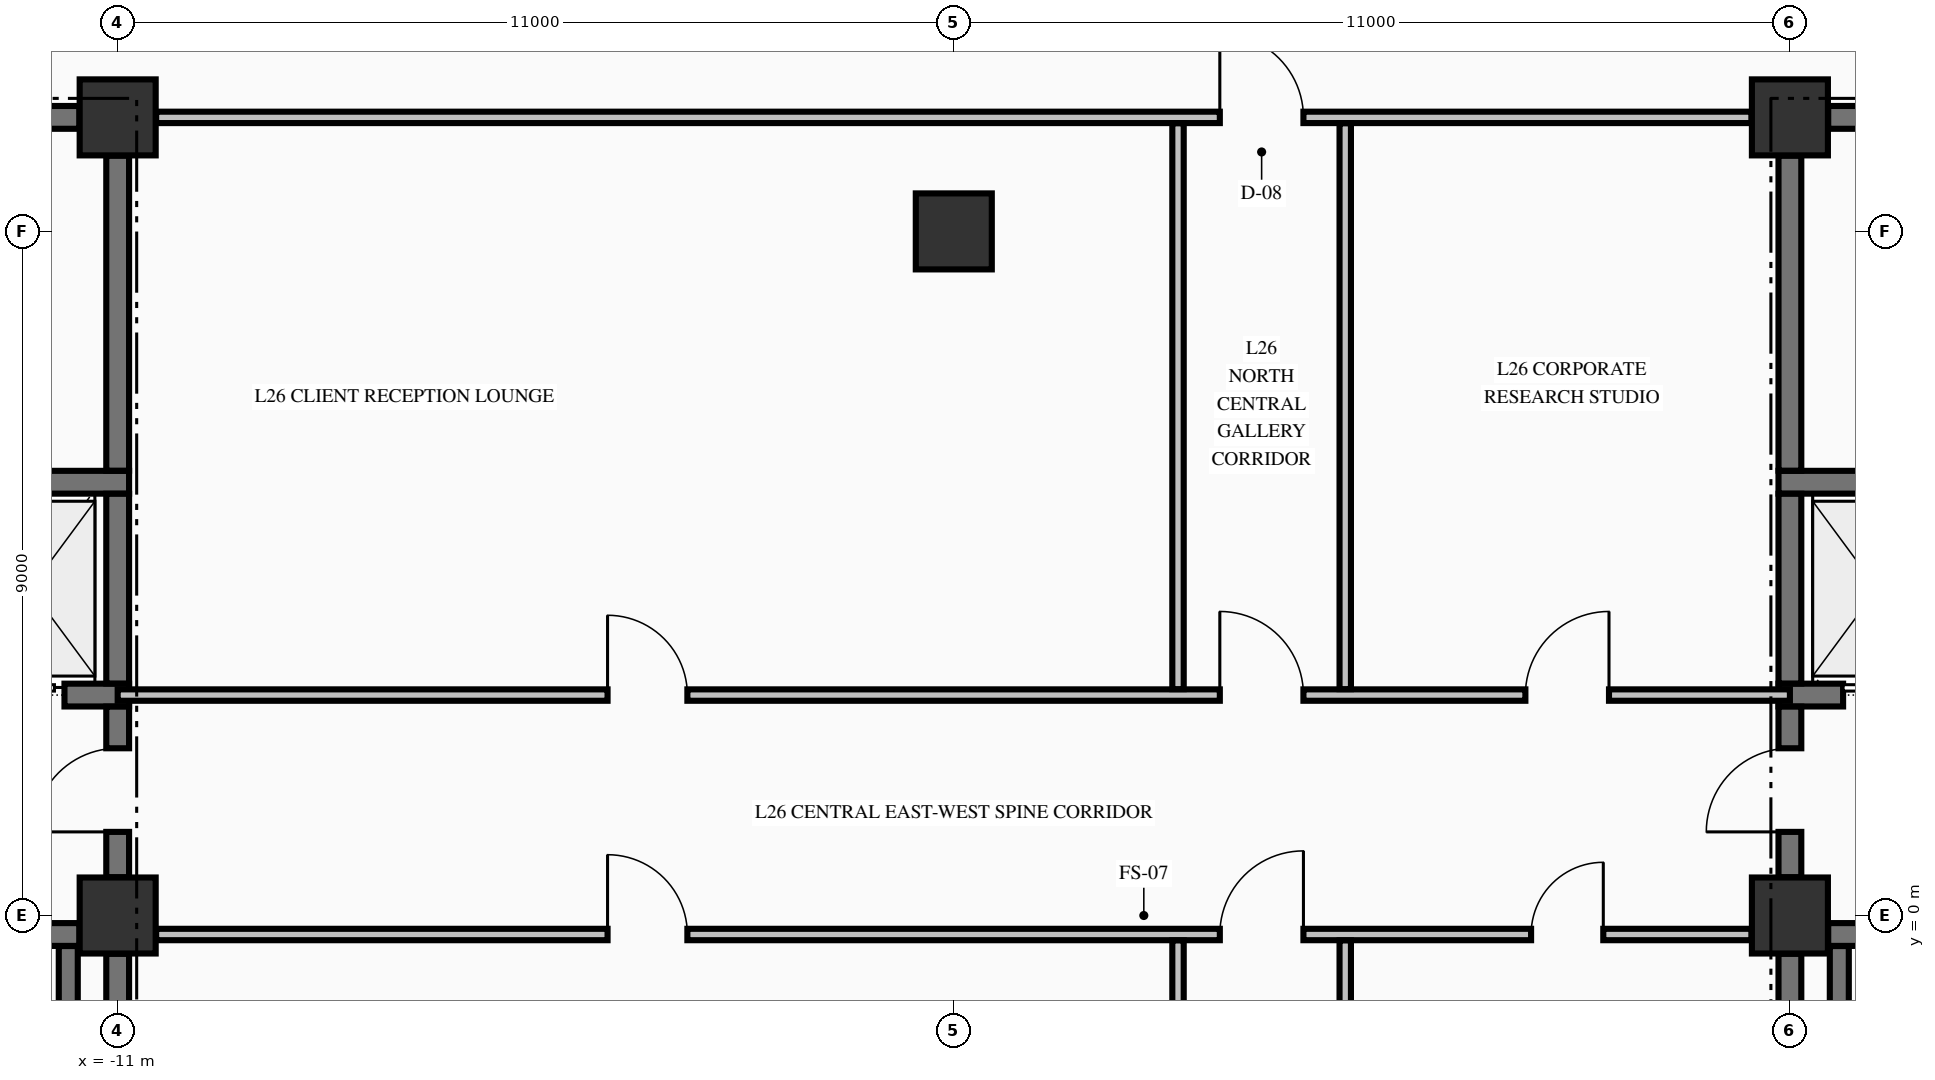
"""IFC4 building model, lengths in metres.
Left out: names, types, materials, properties, quantities, classifications, styles, units other than length and angle.
Written with IfcOpenShell. Run it as: python <this file> out.ifc"""

import sys

from ifc_helpers import new_model, si_unit, direction, frame, frame_2d, origin, origin_2d, place, context, subcontext, project, spatial, rectangle, extrude, element, fill, save


model = new_model("IFC4")
c1 = context("Model", 3, precision=1e-05, world=origin(), true_north=direction((0.0, 1.0)))
c2 = subcontext(c1, "Body", "Model", "MODEL_VIEW")
j1 = project(units=[si_unit("LENGTHUNIT", "METRE"), si_unit("PLANEANGLEUNIT", "RADIAN")], contexts=[c1])
p1 = place(None, origin())
s1 = spatial("IfcSite", under=j1, at=p1, CompositionType="ELEMENT")
p2 = place(p1, origin())
s2 = spatial("IfcBuilding", under=s1, at=p2, CompositionType="ELEMENT")
p3 = place(p2, frame((0.0, 0.0, 105.64)))
s3 = spatial("IfcBuildingStorey", under=s2, at=p3, CompositionType="ELEMENT", Elevation=105.64)
for number, where, z_axis, x_axis in (
    (1, (-11.0, 0.0, -0.25), (0.0, 0.0, 1.0), (1.0, 0.0, 0.0)),
    (2, (-11.0, 10.5, -0.25), (0.0, 0.0, 1.0), (1.0, 0.0, 0.0)),
    (3, (11.0, 0.0, -0.25), (0.0, 0.0, 1.0), (1.0, 0.0, 0.0)),
    (4, (11.0, 10.5, -0.25), (0.0, 0.0, 1.0), (1.0, 0.0, 0.0)),
    (5, (0.0, 9.0, -0.25), (0.0, 0.0, 1.0), (1.0, 0.0, 0.0)),
):
    element("IfcColumn", number, at=place(p3, frame(where, z_axis=z_axis, x_axis=x_axis)), inside=s3, PredefinedType="COLUMN", context=c2, shape_type="SweptSolid", body=[
        extrude(rectangle(XDim=1.0, YDim=1.0, at=origin_2d()), origin(), (0.0, 0.0, 1.0), 3.57),
    ])
p4 = place(p3, frame((-19.496, -0.25, 0.0), z_axis=(0.0, 0.0, 1.0), x_axis=(1.0, 0.0, 0.0)))
e6 = element("IfcWall", 6, at=p4, inside=s3, PredefinedType="SHEAR", context=c2, shape_type="SweptSolid", body=[
    extrude(rectangle(XDim=7.992, YDim=0.3, at=frame_2d((3.996, 0.0))), origin(), (0.0, 0.0, 1.0), 3.32),
])
p5 = place(p4, frame((5.796, 0.0, 0.0)))
e7 = element("IfcOpeningElement", 7, at=p5, cuts=e6, PredefinedType="OPENING", context=c2, shape_type="SweptSolid", body=[
    extrude(rectangle(XDim=1.1, YDim=2.15, at=frame_2d((0.55, 1.075))), frame((0.0, 0.16, 0.0), z_axis=(0.0, -1.0, 0.0), x_axis=(1.0, 0.0, 0.0)), (0.0, 0.0, 1.0), 0.32),
])
p6 = place(p3, frame((11.504, -0.25, 0.0), z_axis=(0.0, 0.0, 1.0), x_axis=(1.0, 0.0, 0.0)))
e8 = element("IfcWall", 8, at=p6, inside=s3, PredefinedType="SHEAR", context=c2, shape_type="SweptSolid", body=[
    extrude(rectangle(XDim=3.371, YDim=0.3, at=frame_2d((1.686, 0.0))), origin(), (0.0, 0.0, 1.0), 3.32),
])
p7 = place(p6, frame((1.096, 0.0, 0.0)))
e9 = element("IfcOpeningElement", 9, at=p7, cuts=e8, PredefinedType="OPENING", context=c2, shape_type="SweptSolid", body=[
    extrude(rectangle(XDim=1.1, YDim=2.15, at=frame_2d((0.55, 1.075))), frame((0.0, 0.16, 0.0), z_axis=(0.0, -1.0, 0.0), x_axis=(1.0, 0.0, 0.0)), (0.0, 0.0, 1.0), 0.32),
])
p8 = place(p3, frame((-14.875, 2.9, 0.0), z_axis=(0.0, 0.0, 1.0), x_axis=(1.0, 0.0, 0.0)))
e10 = element("IfcWall", 10, at=p8, inside=s3, PredefinedType="SHEAR", context=c2, shape_type="SweptSolid", body=[
    extrude(rectangle(XDim=4.025, YDim=0.3, at=frame_2d((2.012, 0.0))), origin(), (0.0, 0.0, 1.0), 3.32),
])
p9 = place(p8, frame((2.075, 0.0, 0.0)))
e11 = element("IfcOpeningElement", 11, at=p9, cuts=e10, PredefinedType="OPENING", context=c2, shape_type="SweptSolid", body=[
    extrude(rectangle(XDim=1.1, YDim=2.2, at=frame_2d((0.55, 1.1))), frame((0.0, 0.16, 0.0), z_axis=(0.0, -1.0, 0.0), x_axis=(1.0, 0.0, 0.0)), (0.0, 0.0, 1.0), 0.32),
])
p10 = place(p3, frame((10.85, 2.9, 0.0), z_axis=(0.0, 0.0, 1.0), x_axis=(1.0, 0.0, 0.0)))
e12 = element("IfcWall", 12, at=p10, inside=s3, PredefinedType="SHEAR", context=c2, shape_type="SweptSolid", body=[
    extrude(rectangle(XDim=4.025, YDim=0.3, at=frame_2d((2.012, 0.0))), origin(), (0.0, 0.0, 1.0), 3.32),
])
p11 = place(p10, frame((0.85, 0.0, 0.0)))
e13 = element("IfcOpeningElement", 13, at=p11, cuts=e12, PredefinedType="OPENING", context=c2, shape_type="SweptSolid", body=[
    extrude(rectangle(XDim=1.1, YDim=2.2, at=frame_2d((0.55, 1.1))), frame((0.0, 0.16, 0.0), z_axis=(0.0, -1.0, 0.0), x_axis=(1.0, 0.0, 0.0)), (0.0, 0.0, 1.0), 0.32),
])
for number, where, z_axis, x_axis in (
    (14, (-14.875, 5.7, 0.0), (0.0, 0.0, 1.0), (1.0, 0.0, 0.0)),
    (15, (10.85, 5.7, 0.0), (0.0, 0.0, 1.0), (1.0, 0.0, 0.0)),
):
    element("IfcWall", number, at=place(p3, frame(where, z_axis=z_axis, x_axis=x_axis)), inside=s3, PredefinedType="SHEAR", context=c2, shape_type="SweptSolid", body=[
        extrude(rectangle(XDim=4.025, YDim=0.3, at=frame_2d((2.012, 0.0))), origin(), (0.0, 0.0, 1.0), 3.32),
    ])
p12 = place(p3, frame((-14.7, 10.5, 0.0), z_axis=(0.0, 0.0, 1.0), x_axis=(1.0, 0.0, 0.0)))
e16 = element("IfcWall", 16, at=p12, inside=s3, PredefinedType="SHEAR", context=c2, shape_type="SweptSolid", body=[
    extrude(rectangle(XDim=3.196, YDim=0.3, at=frame_2d((1.598, 0.0))), origin(), (0.0, 0.0, 1.0), 3.32),
])
p13 = place(p12, frame((0.775, 0.0, 0.0)))
e17 = element("IfcOpeningElement", 17, at=p13, cuts=e16, PredefinedType="OPENING", context=c2, shape_type="SweptSolid", body=[
    extrude(rectangle(XDim=0.95, YDim=2.15, at=frame_2d((0.475, 1.075))), frame((0.0, 0.16, 0.0), z_axis=(0.0, -1.0, 0.0), x_axis=(1.0, 0.0, 0.0)), (0.0, 0.0, 1.0), 0.32),
])
p14 = place(p3, frame((11.504, 10.5, 0.0), z_axis=(0.0, 0.0, 1.0), x_axis=(1.0, 0.0, 0.0)))
e18 = element("IfcWall", 18, at=p14, inside=s3, PredefinedType="SHEAR", context=c2, shape_type="SweptSolid", body=[
    extrude(rectangle(XDim=3.196, YDim=0.3, at=frame_2d((1.598, 0.0))), origin(), (0.0, 0.0, 1.0), 3.32),
])
p15 = place(p14, frame((1.471, 0.0, 0.0)))
e19 = element("IfcOpeningElement", 19, at=p15, cuts=e18, PredefinedType="OPENING", context=c2, shape_type="SweptSolid", body=[
    extrude(rectangle(XDim=0.95, YDim=2.15, at=frame_2d((0.475, 1.075))), frame((0.0, 0.16, 0.0), z_axis=(0.0, -1.0, 0.0), x_axis=(1.0, 0.0, 0.0)), (0.0, 0.0, 1.0), 0.32),
])
p16 = place(p3, frame((-10.494, -0.25, 0.0), z_axis=(0.0, 0.0, 1.0), x_axis=(1.0, 0.0, 0.0)))
e20 = element("IfcWall", 20, at=p16, inside=s3, PredefinedType="PARTITIONING", context=c2, shape_type="SweptSolid", body=[
    extrude(rectangle(XDim=20.988, YDim=0.15, at=frame_2d((10.494, 0.0))), origin(), (0.0, 0.0, 1.0), 3.32),
])
p17 = place(p16, frame((13.994, 0.0, 0.0)))
e21 = element("IfcOpeningElement", 21, at=p17, cuts=e20, PredefinedType="OPENING", context=c2, shape_type="SweptSolid", body=[
    extrude(rectangle(XDim=1.1, YDim=2.15, at=frame_2d((0.55, 1.075))), frame((0.0, 0.085, 0.0), z_axis=(0.0, -1.0, 0.0), x_axis=(1.0, 0.0, 0.0)), (0.0, 0.0, 1.0), 0.17),
])
p18 = place(p16, frame((5.939, 0.0, 0.0)))
e22 = element("IfcOpeningElement", 22, at=p18, cuts=e20, PredefinedType="OPENING", context=c2, shape_type="SweptSolid", body=[
    extrude(rectangle(XDim=1.05, YDim=2.15, at=frame_2d((0.525, 1.075))), frame((0.0, 0.085, 0.0), z_axis=(0.0, -1.0, 0.0), x_axis=(1.0, 0.0, 0.0)), (0.0, 0.0, 1.0), 0.17),
])
p19 = place(p16, frame((18.089, 0.0, 0.0)))
e23 = element("IfcOpeningElement", 23, at=p19, cuts=e20, PredefinedType="OPENING", context=c2, shape_type="SweptSolid", body=[
    extrude(rectangle(XDim=0.95, YDim=2.15, at=frame_2d((0.475, 1.075))), frame((0.0, 0.085, 0.0), z_axis=(0.0, -1.0, 0.0), x_axis=(1.0, 0.0, 0.0)), (0.0, 0.0, 1.0), 0.17),
])
p20 = place(p3, frame((-11.0, 2.9, 0.0), z_axis=(0.0, 0.0, 1.0), x_axis=(1.0, 0.0, 0.0)))
e24 = element("IfcWall", 24, at=p20, inside=s3, PredefinedType="PARTITIONING", context=c2, shape_type="SweptSolid", body=[
    extrude(rectangle(XDim=22.0, YDim=0.15, at=frame_2d((11.0, 0.0))), origin(), (0.0, 0.0, 1.0), 3.32),
])
p21 = place(p20, frame((14.5, 0.0, 0.0)))
e25 = element("IfcOpeningElement", 25, at=p21, cuts=e24, PredefinedType="OPENING", context=c2, shape_type="SweptSolid", body=[
    extrude(rectangle(XDim=1.1, YDim=2.15, at=frame_2d((0.55, 1.075))), frame((0.0, 0.085, 0.0), z_axis=(0.0, -1.0, 0.0), x_axis=(1.0, 0.0, 0.0)), (0.0, 0.0, 1.0), 0.17),
])
p22 = place(p20, frame((6.445, 0.0, 0.0)))
e26 = element("IfcOpeningElement", 26, at=p22, cuts=e24, PredefinedType="OPENING", context=c2, shape_type="SweptSolid", body=[
    extrude(rectangle(XDim=1.05, YDim=2.15, at=frame_2d((0.525, 1.075))), frame((0.0, 0.085, 0.0), z_axis=(0.0, -1.0, 0.0), x_axis=(1.0, 0.0, 0.0)), (0.0, 0.0, 1.0), 0.17),
])
p23 = place(p20, frame((18.52, 0.0, 0.0)))
e27 = element("IfcOpeningElement", 27, at=p23, cuts=e24, PredefinedType="OPENING", context=c2, shape_type="SweptSolid", body=[
    extrude(rectangle(XDim=1.1, YDim=2.15, at=frame_2d((0.55, 1.075))), frame((0.0, 0.085, 0.0), z_axis=(0.0, -1.0, 0.0), x_axis=(1.0, 0.0, 0.0)), (0.0, 0.0, 1.0), 0.17),
])
p24 = place(p3, frame((-10.494, 10.5, 0.0), z_axis=(0.0, 0.0, 1.0), x_axis=(1.0, 0.0, 0.0)))
e28 = element("IfcWall", 28, at=p24, inside=s3, PredefinedType="PARTITIONING", context=c2, shape_type="SweptSolid", body=[
    extrude(rectangle(XDim=20.988, YDim=0.15, at=frame_2d((10.494, 0.0))), origin(), (0.0, 0.0, 1.0), 3.32),
])
p25 = place(p24, frame((13.994, 0.0, 0.0)))
e29 = element("IfcOpeningElement", 29, at=p25, cuts=e28, PredefinedType="OPENING", context=c2, shape_type="SweptSolid", body=[
    extrude(rectangle(XDim=1.1, YDim=2.15, at=frame_2d((0.55, 1.075))), frame((0.0, 0.085, 0.0), z_axis=(0.0, -1.0, 0.0), x_axis=(1.0, 0.0, 0.0)), (0.0, 0.0, 1.0), 0.17),
])
p26 = place(p3, frame((-11.65, -9.798, 0.0), z_axis=(0.0, 0.0, 1.0), x_axis=(0.0, 1.0, 0.0)))
e30 = element("IfcWall", 30, at=p26, inside=s3, PredefinedType="SOLIDWALL", context=c2, shape_type="SweptSolid", body=[
    extrude(rectangle(XDim=9.396, YDim=0.25, at=frame_2d((4.698, 0.0))), origin(), (0.0, 0.0, 1.0), 3.32),
])
p27 = place(p3, frame((-11.0, -9.446, 0.0), z_axis=(0.0, 0.0, 1.0), x_axis=(0.0, 1.0, 0.0)))
e31 = element("IfcWall", 31, at=p27, inside=s3, PredefinedType="SHEAR", context=c2, shape_type="SweptSolid", body=[
    extrude(rectangle(XDim=8.942, YDim=0.3, at=frame_2d((4.471, 0.0))), origin(), (0.0, 0.0, 1.0), 3.32),
])
p28 = place(p3, frame((-11.0, 0.504, 0.0), z_axis=(0.0, 0.0, 1.0), x_axis=(0.0, 1.0, 0.0)))
e32 = element("IfcWall", 32, at=p28, inside=s3, PredefinedType="SHEAR", context=c2, shape_type="SweptSolid", body=[
    extrude(rectangle(XDim=2.244, YDim=0.3, at=frame_2d((1.122, 0.0))), origin(), (0.0, 0.0, 1.0), 3.32),
])
p29 = place(p28, frame((0.596, 0.0, 0.0)))
e33 = element("IfcOpeningElement", 33, at=p29, cuts=e32, PredefinedType="OPENING", context=c2, shape_type="SweptSolid", body=[
    extrude(rectangle(XDim=1.1, YDim=2.15, at=frame_2d((0.55, 1.075))), frame((0.0, 0.16, 0.0), z_axis=(0.0, -1.0, 0.0), x_axis=(1.0, 0.0, 0.0)), (0.0, 0.0, 1.0), 0.32),
])
p30 = place(p3, frame((-11.0, 3.052, 0.0), z_axis=(0.0, 0.0, 1.0), x_axis=(0.0, 1.0, 0.0)))
e34 = element("IfcWall", 34, at=p30, inside=s3, PredefinedType="SHEAR", context=c2, shape_type="SweptSolid", body=[
    extrude(rectangle(XDim=2.496, YDim=0.3, at=frame_2d((1.248, 0.0))), origin(), (0.0, 0.0, 1.0), 3.32),
])
p31 = place(p3, frame((-11.0, 5.852, 0.0), z_axis=(0.0, 0.0, 1.0), x_axis=(0.0, 1.0, 0.0)))
e35 = element("IfcWall", 35, at=p31, inside=s3, PredefinedType="SHEAR", context=c2, shape_type="SweptSolid", body=[
    extrude(rectangle(XDim=4.144, YDim=0.3, at=frame_2d((2.072, 0.0))), origin(), (0.0, 0.0, 1.0), 3.32),
])
p32 = place(p3, frame((11.0, -9.446, 0.0), z_axis=(0.0, 0.0, 1.0), x_axis=(0.0, 1.0, 0.0)))
e36 = element("IfcWall", 36, at=p32, inside=s3, PredefinedType="SHEAR", context=c2, shape_type="SweptSolid", body=[
    extrude(rectangle(XDim=8.942, YDim=0.3, at=frame_2d((4.471, 0.0))), origin(), (0.0, 0.0, 1.0), 3.32),
])
p33 = place(p3, frame((11.0, 0.504, 0.0), z_axis=(0.0, 0.0, 1.0), x_axis=(0.0, 1.0, 0.0)))
e37 = element("IfcWall", 37, at=p33, inside=s3, PredefinedType="SHEAR", context=c2, shape_type="SweptSolid", body=[
    extrude(rectangle(XDim=2.244, YDim=0.3, at=frame_2d((1.122, 0.0))), origin(), (0.0, 0.0, 1.0), 3.32),
])
p34 = place(p33, frame((0.596, 0.0, 0.0)))
e38 = element("IfcOpeningElement", 38, at=p34, cuts=e37, PredefinedType="OPENING", context=c2, shape_type="SweptSolid", body=[
    extrude(rectangle(XDim=1.1, YDim=2.15, at=frame_2d((0.55, 1.075))), frame((0.0, 0.16, 0.0), z_axis=(0.0, -1.0, 0.0), x_axis=(1.0, 0.0, 0.0)), (0.0, 0.0, 1.0), 0.32),
])
p35 = place(p3, frame((11.0, 3.052, 0.0), z_axis=(0.0, 0.0, 1.0), x_axis=(0.0, 1.0, 0.0)))
e39 = element("IfcWall", 39, at=p35, inside=s3, PredefinedType="SHEAR", context=c2, shape_type="SweptSolid", body=[
    extrude(rectangle(XDim=2.496, YDim=0.3, at=frame_2d((1.248, 0.0))), origin(), (0.0, 0.0, 1.0), 3.32),
])
p36 = place(p3, frame((11.0, 5.852, 0.0), z_axis=(0.0, 0.0, 1.0), x_axis=(0.0, 1.0, 0.0)))
e40 = element("IfcWall", 40, at=p36, inside=s3, PredefinedType="SHEAR", context=c2, shape_type="SweptSolid", body=[
    extrude(rectangle(XDim=4.144, YDim=0.3, at=frame_2d((2.072, 0.0))), origin(), (0.0, 0.0, 1.0), 3.32),
])
p37 = place(p3, frame((11.65, -9.798, 0.0), z_axis=(0.0, 0.0, 1.0), x_axis=(0.0, 1.0, 0.0)))
e41 = element("IfcWall", 41, at=p37, inside=s3, PredefinedType="SOLIDWALL", context=c2, shape_type="SweptSolid", body=[
    extrude(rectangle(XDim=9.396, YDim=0.25, at=frame_2d((4.698, 0.0))), origin(), (0.0, 0.0, 1.0), 3.32),
])
p38 = place(p3, frame((2.95, -9.872, 0.0), z_axis=(0.0, 0.0, 1.0), x_axis=(0.0, 1.0, 0.0)))
e42 = element("IfcWall", 42, at=p38, inside=s3, PredefinedType="PARTITIONING", context=c2, shape_type="SweptSolid", body=[
    extrude(rectangle(XDim=9.544, YDim=0.15, at=frame_2d((4.772, 0.0))), origin(), (0.0, 0.0, 1.0), 3.32),
])
p39 = place(p3, frame((2.95, 2.978, 0.0), z_axis=(0.0, 0.0, 1.0), x_axis=(0.0, 1.0, 0.0)))
e43 = element("IfcWall", 43, at=p39, inside=s3, PredefinedType="PARTITIONING", context=c2, shape_type="SweptSolid", body=[
    extrude(rectangle(XDim=7.444, YDim=0.15, at=frame_2d((3.722, 0.0))), origin(), (0.0, 0.0, 1.0), 3.32),
])
p40 = place(p3, frame((5.15, -4.747, 0.0), z_axis=(0.0, 0.0, 1.0), x_axis=(0.0, 1.0, 0.0)))
e44 = element("IfcWall", 44, at=p40, inside=s3, PredefinedType="PARTITIONING", context=c2, shape_type="SweptSolid", body=[
    extrude(rectangle(XDim=4.419, YDim=0.15, at=frame_2d((2.209, 0.0))), origin(), (0.0, 0.0, 1.0), 3.32),
])
p41 = place(p3, frame((5.15, 2.978, 0.0), z_axis=(0.0, 0.0, 1.0), x_axis=(0.0, 1.0, 0.0)))
e45 = element("IfcWall", 45, at=p41, inside=s3, PredefinedType="PARTITIONING", context=c2, shape_type="SweptSolid", body=[
    extrude(rectangle(XDim=7.444, YDim=0.15, at=frame_2d((3.722, 0.0))), origin(), (0.0, 0.0, 1.0), 3.32),
])
p42 = place(p29, origin())
e46 = element("IfcDoor", 46, at=p42, inside=s3, OperationType="SINGLE_SWING_LEFT", PredefinedType="DOOR", context=c2, shape_type="SweptSolid", body=[
    extrude(rectangle(XDim=1.1, YDim=2.15, at=frame_2d((0.55, 1.075))), frame((0.0, 0.025, 0.0), z_axis=(0.0, -1.0, 0.0), x_axis=(1.0, 0.0, 0.0)), (0.0, 0.0, 1.0), 0.05),
])
fill(e33, e46)
p43 = place(p9, origin())
e47 = element("IfcDoor", 47, at=p43, inside=s3, OperationType="SLIDING_TO_LEFT", PredefinedType="DOOR", context=c2, shape_type="SweptSolid", body=[
    extrude(rectangle(XDim=1.1, YDim=2.2, at=frame_2d((0.55, 1.1))), frame((0.0, 0.025, 0.0), z_axis=(0.0, -1.0, 0.0), x_axis=(1.0, 0.0, 0.0)), (0.0, 0.0, 1.0), 0.05),
])
fill(e11, e47)
p44 = place(p34, origin())
e48 = element("IfcDoor", 48, at=p44, inside=s3, OperationType="SINGLE_SWING_LEFT", PredefinedType="DOOR", context=c2, shape_type="SweptSolid", body=[
    extrude(rectangle(XDim=1.1, YDim=2.15, at=frame_2d((0.55, 1.075))), frame((0.0, 0.025, 0.0), z_axis=(0.0, -1.0, 0.0), x_axis=(1.0, 0.0, 0.0)), (0.0, 0.0, 1.0), 0.05),
])
fill(e38, e48)
p45 = place(p11, origin())
e49 = element("IfcDoor", 49, at=p45, inside=s3, OperationType="SLIDING_TO_RIGHT", PredefinedType="DOOR", context=c2, shape_type="SweptSolid", body=[
    extrude(rectangle(XDim=1.1, YDim=2.2, at=frame_2d((0.55, 1.1))), frame((0.0, 0.025, 0.0), z_axis=(0.0, -1.0, 0.0), x_axis=(1.0, 0.0, 0.0)), (0.0, 0.0, 1.0), 0.05),
])
fill(e13, e49)
p46 = place(p25, origin())
e50 = element("IfcDoor", 50, at=p46, inside=s3, OperationType="SINGLE_SWING_LEFT", PredefinedType="DOOR", context=c2, shape_type="SweptSolid", body=[
    extrude(rectangle(XDim=1.1, YDim=2.15, at=frame_2d((0.55, 1.075))), frame((0.0, 0.025, 0.0), z_axis=(0.0, -1.0, 0.0), x_axis=(1.0, 0.0, 0.0)), (0.0, 0.0, 1.0), 0.05),
])
fill(e29, e50)
p47 = place(p21, origin())
e51 = element("IfcDoor", 51, at=p47, inside=s3, OperationType="SINGLE_SWING_LEFT", PredefinedType="DOOR", context=c2, shape_type="SweptSolid", body=[
    extrude(rectangle(XDim=1.1, YDim=2.15, at=frame_2d((0.55, 1.075))), frame((0.0, 0.025, 0.0), z_axis=(0.0, -1.0, 0.0), x_axis=(1.0, 0.0, 0.0)), (0.0, 0.0, 1.0), 0.05),
])
fill(e25, e51)
p48 = place(p17, origin())
e52 = element("IfcDoor", 52, at=p48, inside=s3, OperationType="SINGLE_SWING_RIGHT", PredefinedType="DOOR", context=c2, shape_type="SweptSolid", body=[
    extrude(rectangle(XDim=1.1, YDim=2.15, at=frame_2d((0.55, 1.075))), frame((0.0, 0.025, 0.0), z_axis=(0.0, -1.0, 0.0), x_axis=(1.0, 0.0, 0.0)), (0.0, 0.0, 1.0), 0.05),
])
fill(e21, e52)
p49 = place(p22, origin())
e53 = element("IfcDoor", 53, at=p49, inside=s3, OperationType="SINGLE_SWING_LEFT", PredefinedType="DOOR", context=c2, shape_type="SweptSolid", body=[
    extrude(rectangle(XDim=1.05, YDim=2.15, at=frame_2d((0.525, 1.075))), frame((0.0, 0.025, 0.0), z_axis=(0.0, -1.0, 0.0), x_axis=(1.0, 0.0, 0.0)), (0.0, 0.0, 1.0), 0.05),
])
fill(e26, e53)
p50 = place(p23, origin())
e54 = element("IfcDoor", 54, at=p50, inside=s3, OperationType="SINGLE_SWING_RIGHT", PredefinedType="DOOR", context=c2, shape_type="SweptSolid", body=[
    extrude(rectangle(XDim=1.1, YDim=2.15, at=frame_2d((0.55, 1.075))), frame((0.0, 0.025, 0.0), z_axis=(0.0, -1.0, 0.0), x_axis=(1.0, 0.0, 0.0)), (0.0, 0.0, 1.0), 0.05),
])
fill(e27, e54)
p51 = place(p18, origin())
e55 = element("IfcDoor", 55, at=p51, inside=s3, OperationType="SINGLE_SWING_LEFT", PredefinedType="DOOR", context=c2, shape_type="SweptSolid", body=[
    extrude(rectangle(XDim=1.05, YDim=2.15, at=frame_2d((0.525, 1.075))), frame((0.0, 0.025, 0.0), z_axis=(0.0, -1.0, 0.0), x_axis=(1.0, 0.0, 0.0)), (0.0, 0.0, 1.0), 0.05),
])
fill(e22, e55)
p52 = place(p19, origin())
e56 = element("IfcDoor", 56, at=p52, inside=s3, OperationType="SINGLE_SWING_RIGHT", PredefinedType="DOOR", context=c2, shape_type="SweptSolid", body=[
    extrude(rectangle(XDim=0.95, YDim=2.15, at=frame_2d((0.475, 1.075))), frame((0.0, 0.025, 0.0), z_axis=(0.0, -1.0, 0.0), x_axis=(1.0, 0.0, 0.0)), (0.0, 0.0, 1.0), 0.05),
])
fill(e23, e56)
save(model, sys.argv[1])
